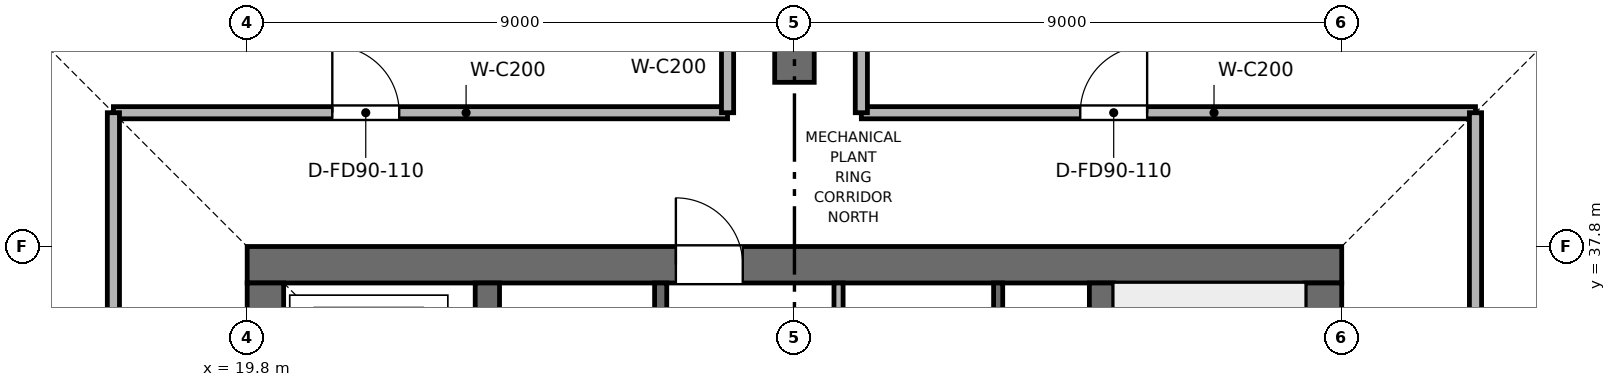
"""IFC4 building model, lengths in metres.
Left out: names, types, materials, properties, quantities, classifications, styles, units other than length and angle.
Written with IfcOpenShell. Run it as: python <this file> out.ifc"""

import sys

from ifc_helpers import new_model, si_unit, direction, frame, frame_2d, origin, place, context, subcontext, project, spatial, rectangle, extrude, element, fill, save


model = new_model("IFC4")
c1 = context("Model", 3, precision=1e-05, world=origin(), true_north=direction((0.0, 1.0)))
c2 = subcontext(c1, "Body", "Model", "MODEL_VIEW")
j1 = project(units=[si_unit("LENGTHUNIT", "METRE"), si_unit("PLANEANGLEUNIT", "RADIAN")], contexts=[c1])
p1 = place(None, origin())
s1 = spatial("IfcSite", under=j1, at=p1, CompositionType="ELEMENT")
p2 = place(p1, origin())
s2 = spatial("IfcBuilding", under=s1, at=p2, CompositionType="ELEMENT")
p3 = place(p2, frame((0.0, 0.0, 284.1)))
s3 = spatial("IfcBuildingStorey", under=s2, at=p3, CompositionType="ELEMENT", Elevation=284.1)
p4 = place(p3, frame((19.8, 37.5, 0.0), z_axis=(0.0, 0.0, 1.0), x_axis=(1.0, 0.0, 0.0)))
e1 = element("IfcWall", 1, at=p4, inside=s3, PredefinedType="SHEAR", context=c2, shape_type="SweptSolid", body=[
    extrude(rectangle(XDim=18.0, YDim=0.6, at=frame_2d((9.0, 0.0))), origin(), (0.0, 0.0, 1.0), 5.4),
])
p5 = place(p4, frame((7.05, 0.0, 0.0)))
e2 = element("IfcOpeningElement", 2, at=p5, cuts=e1, PredefinedType="OPENING", context=c2, shape_type="SweptSolid", body=[
    extrude(rectangle(XDim=1.1, YDim=2.15, at=frame_2d((0.55, 1.075))), frame((0.0, 0.31, 0.0), z_axis=(0.0, -1.0, 0.0), x_axis=(1.0, 0.0, 0.0)), (0.0, 0.0, 1.0), 0.62),
])
p6 = place(p3, frame((20.1, 20.4, 0.0), z_axis=(0.0, 0.0, 1.0), x_axis=(0.0, 1.0, 0.0)))
e3 = element("IfcWall", 3, at=p6, inside=s3, PredefinedType="SHEAR", context=c2, shape_type="SweptSolid", body=[
    extrude(rectangle(XDim=16.8, YDim=0.6, at=frame_2d((8.4, 0.0))), origin(), (0.0, 0.0, 1.0), 5.4),
])
p7 = place(p6, frame((10.4, 0.0, 0.0)))
e4 = element("IfcOpeningElement", 4, at=p7, cuts=e3, PredefinedType="OPENING", context=c2, shape_type="SweptSolid", body=[
    extrude(rectangle(XDim=1.1, YDim=2.15, at=frame_2d((0.55, 1.075))), frame((0.0, 0.31, 0.0), z_axis=(0.0, -1.0, 0.0), x_axis=(1.0, 0.0, 0.0)), (0.0, 0.0, 1.0), 0.62),
])
p8 = place(p3, frame((37.5, 20.4, 0.0), z_axis=(0.0, 0.0, 1.0), x_axis=(0.0, 1.0, 0.0)))
e5 = element("IfcWall", 5, at=p8, inside=s3, PredefinedType="SHEAR", context=c2, shape_type="SweptSolid", body=[
    extrude(rectangle(XDim=16.8, YDim=0.6, at=frame_2d((8.4, 0.0))), origin(), (0.0, 0.0, 1.0), 5.4),
])
p9 = place(p8, frame((4.9, 0.0, 0.0)))
e6 = element("IfcOpeningElement", 6, at=p9, cuts=e5, PredefinedType="OPENING", context=c2, shape_type="SweptSolid", body=[
    extrude(rectangle(XDim=1.1, YDim=2.15, at=frame_2d((0.55, 1.075))), frame((0.0, 0.31, 0.0), z_axis=(0.0, -1.0, 0.0), x_axis=(1.0, 0.0, 0.0)), (0.0, 0.0, 1.0), 0.62),
])
for number, where, z_axis, x_axis in (
    (7, (23.75, 20.4, 0.0), (0.0, 0.0, 1.0), (0.0, 1.0, 0.0)),
    (8, (33.85, 20.4, 0.0), (0.0, 0.0, 1.0), (0.0, 1.0, 0.0)),
):
    element("IfcWall", number, at=place(p3, frame(where, z_axis=z_axis, x_axis=x_axis)), inside=s3, PredefinedType="SHEAR", context=c2, shape_type="SweptSolid", body=[
        extrude(rectangle(XDim=16.8, YDim=0.4, at=frame_2d((8.4, 0.0))), origin(), (0.0, 0.0, 1.0), 5.4),
    ])
p10 = place(p3, frame((28.8, 40.5, 0.0), z_axis=(0.0, 0.0, 1.0), x_axis=(0.0, 1.0, 0.0)))
e9 = element("IfcWall", 9, at=p10, inside=s3, PredefinedType="SHEAR", context=c2, shape_type="SweptSolid", body=[
    extrude(rectangle(XDim=10.025, YDim=0.65, at=frame_2d((5.012, 0.0))), origin(), (0.0, 0.0, 1.0), 5.05),
])
p11 = place(p3, frame((32.15, 34.0, 0.0), z_axis=(0.0, 0.0, 1.0), x_axis=(0.0, 1.0, 0.0)))
e10 = element("IfcWall", 10, at=p11, inside=s3, PredefinedType="SHEAR", context=c2, shape_type="SweptSolid", body=[
    extrude(rectangle(XDim=3.2, YDim=0.15, at=frame_2d((1.6, 0.0))), origin(), (0.0, 0.0, 1.0), 5.05),
])
p12 = place(p3, frame((26.6, 34.0, 0.0), z_axis=(0.0, 0.0, 1.0), x_axis=(0.0, 1.0, 0.0)))
e11 = element("IfcWall", 11, at=p12, inside=s3, PredefinedType="SHEAR", context=c2, shape_type="SweptSolid", body=[
    extrude(rectangle(XDim=3.2, YDim=0.2, at=frame_2d((1.6, 0.0))), origin(), (0.0, 0.0, 1.0), 5.05),
])
p13 = place(p12, frame((0.75, 0.0, 0.0)))
e12 = element("IfcOpeningElement", 12, at=p13, cuts=e11, PredefinedType="OPENING", context=c2, shape_type="SweptSolid", body=[
    extrude(rectangle(XDim=1.1, YDim=2.15, at=frame_2d((0.55, 1.075))), frame((0.0, 0.11, 0.0), z_axis=(0.0, -1.0, 0.0), x_axis=(1.0, 0.0, 0.0)), (0.0, 0.0, 1.0), 0.22),
])
p14 = place(p3, frame((29.525, 33.925, 0.0), z_axis=(0.0, 0.0, 1.0), x_axis=(0.0, 1.0, 0.0)))
e13 = element("IfcWall", 13, at=p14, inside=s3, PredefinedType="PARTITIONING", context=c2, shape_type="SweptSolid", body=[
    extrude(rectangle(XDim=3.275, YDim=0.15, at=frame_2d((1.637, 0.0))), origin(), (0.0, 0.0, 1.0), 5.05),
])
p15 = place(p14, frame((0.85, 0.0, 0.0)))
e14 = element("IfcOpeningElement", 14, at=p15, cuts=e13, PredefinedType="OPENING", context=c2, shape_type="SweptSolid", body=[
    extrude(rectangle(XDim=0.9, YDim=2.1, at=frame_2d((0.45, 1.05))), frame((0.0, 0.085, 0.0), z_axis=(0.0, -1.0, 0.0), x_axis=(1.0, 0.0, 0.0)), (0.0, 0.0, 1.0), 0.17),
])
p16 = place(p3, frame((17.6, 40.0, 0.0), z_axis=(0.0, 0.0, 1.0), x_axis=(1.0, 0.0, 0.0)))
e15 = element("IfcWall", 15, at=p16, inside=s3, PredefinedType="PARTITIONING", context=c2, shape_type="SweptSolid", body=[
    extrude(rectangle(XDim=10.1, YDim=0.2, at=frame_2d((5.05, 0.0))), origin(), (0.0, 0.0, 1.0), 4.635),
])
p17 = place(p16, frame((3.6, 0.0, 0.0)))
e16 = element("IfcOpeningElement", 16, at=p17, cuts=e15, PredefinedType="OPENING", context=c2, shape_type="SweptSolid", body=[
    extrude(rectangle(XDim=1.1, YDim=2.15, at=frame_2d((0.55, 1.075))), frame((0.0, 0.11, 0.0), z_axis=(0.0, -1.0, 0.0), x_axis=(1.0, 0.0, 0.0)), (0.0, 0.0, 1.0), 0.22),
])
p18 = place(p3, frame((29.9, 40.0, 0.0), z_axis=(0.0, 0.0, 1.0), x_axis=(1.0, 0.0, 0.0)))
e17 = element("IfcWall", 17, at=p18, inside=s3, PredefinedType="PARTITIONING", context=c2, shape_type="SweptSolid", body=[
    extrude(rectangle(XDim=10.1, YDim=0.2, at=frame_2d((5.05, 0.0))), origin(), (0.0, 0.0, 1.0), 4.635),
])
p19 = place(p18, frame((3.6, 0.0, 0.0)))
e18 = element("IfcOpeningElement", 18, at=p19, cuts=e17, PredefinedType="OPENING", context=c2, shape_type="SweptSolid", body=[
    extrude(rectangle(XDim=1.1, YDim=2.15, at=frame_2d((0.55, 1.075))), frame((0.0, 0.11, 0.0), z_axis=(0.0, -1.0, 0.0), x_axis=(1.0, 0.0, 0.0)), (0.0, 0.0, 1.0), 0.22),
])
for number, where, z_axis, x_axis in (
    (19, (17.6, 29.9, 0.0), (0.0, 0.0, 1.0), (0.0, 1.0, 0.0)),
    (20, (40.0, 29.9, 0.0), (0.0, 0.0, 1.0), (0.0, 1.0, 0.0)),
):
    element("IfcWall", number, at=place(p3, frame(where, z_axis=z_axis, x_axis=x_axis)), inside=s3, PredefinedType="PARTITIONING", context=c2, shape_type="SweptSolid", body=[
        extrude(rectangle(XDim=10.1, YDim=0.2, at=frame_2d((5.05, 0.0))), origin(), (0.0, 0.0, 1.0), 4.635),
    ])
for number, where, z_axis, x_axis in (
    (21, (27.7, 40.0, 0.0), (0.0, 0.0, 1.0), (0.0, 1.0, 0.0)),
    (22, (29.9, 40.0, 0.0), (0.0, 0.0, 1.0), (0.0, 1.0, 0.0)),
):
    element("IfcWall", number, at=place(p3, frame(where, z_axis=z_axis, x_axis=x_axis)), inside=s3, PredefinedType="PARTITIONING", context=c2, shape_type="SweptSolid", body=[
        extrude(rectangle(XDim=3.4, YDim=0.2, at=frame_2d((1.7, 0.0))), origin(), (0.0, 0.0, 1.0), 4.675),
    ])
p20 = place(p17, origin())
e23 = element("IfcDoor", 23, at=p20, inside=s3, OperationType="SINGLE_SWING_LEFT", PredefinedType="DOOR", context=c2, shape_type="SweptSolid", body=[
    extrude(rectangle(XDim=1.1, YDim=2.15, at=frame_2d((0.55, 1.075))), frame((0.0, 0.025, 0.0), z_axis=(0.0, -1.0, 0.0), x_axis=(1.0, 0.0, 0.0)), (0.0, 0.0, 1.0), 0.05),
])
fill(e16, e23)
p21 = place(p19, origin())
e24 = element("IfcDoor", 24, at=p21, inside=s3, OperationType="SINGLE_SWING_RIGHT", PredefinedType="DOOR", context=c2, shape_type="SweptSolid", body=[
    extrude(rectangle(XDim=1.1, YDim=2.15, at=frame_2d((0.55, 1.075))), frame((0.0, 0.025, 0.0), z_axis=(0.0, -1.0, 0.0), x_axis=(1.0, 0.0, 0.0)), (0.0, 0.0, 1.0), 0.05),
])
fill(e18, e24)
p22 = place(p5, origin())
e25 = element("IfcDoor", 25, at=p22, inside=s3, OperationType="SINGLE_SWING_LEFT", PredefinedType="DOOR", context=c2, shape_type="SweptSolid", body=[
    extrude(rectangle(XDim=1.1, YDim=2.15, at=frame_2d((0.55, 1.075))), frame((0.0, 0.025, 0.0), z_axis=(0.0, -1.0, 0.0), x_axis=(1.0, 0.0, 0.0)), (0.0, 0.0, 1.0), 0.05),
])
fill(e2, e25)
save(model, sys.argv[1])
